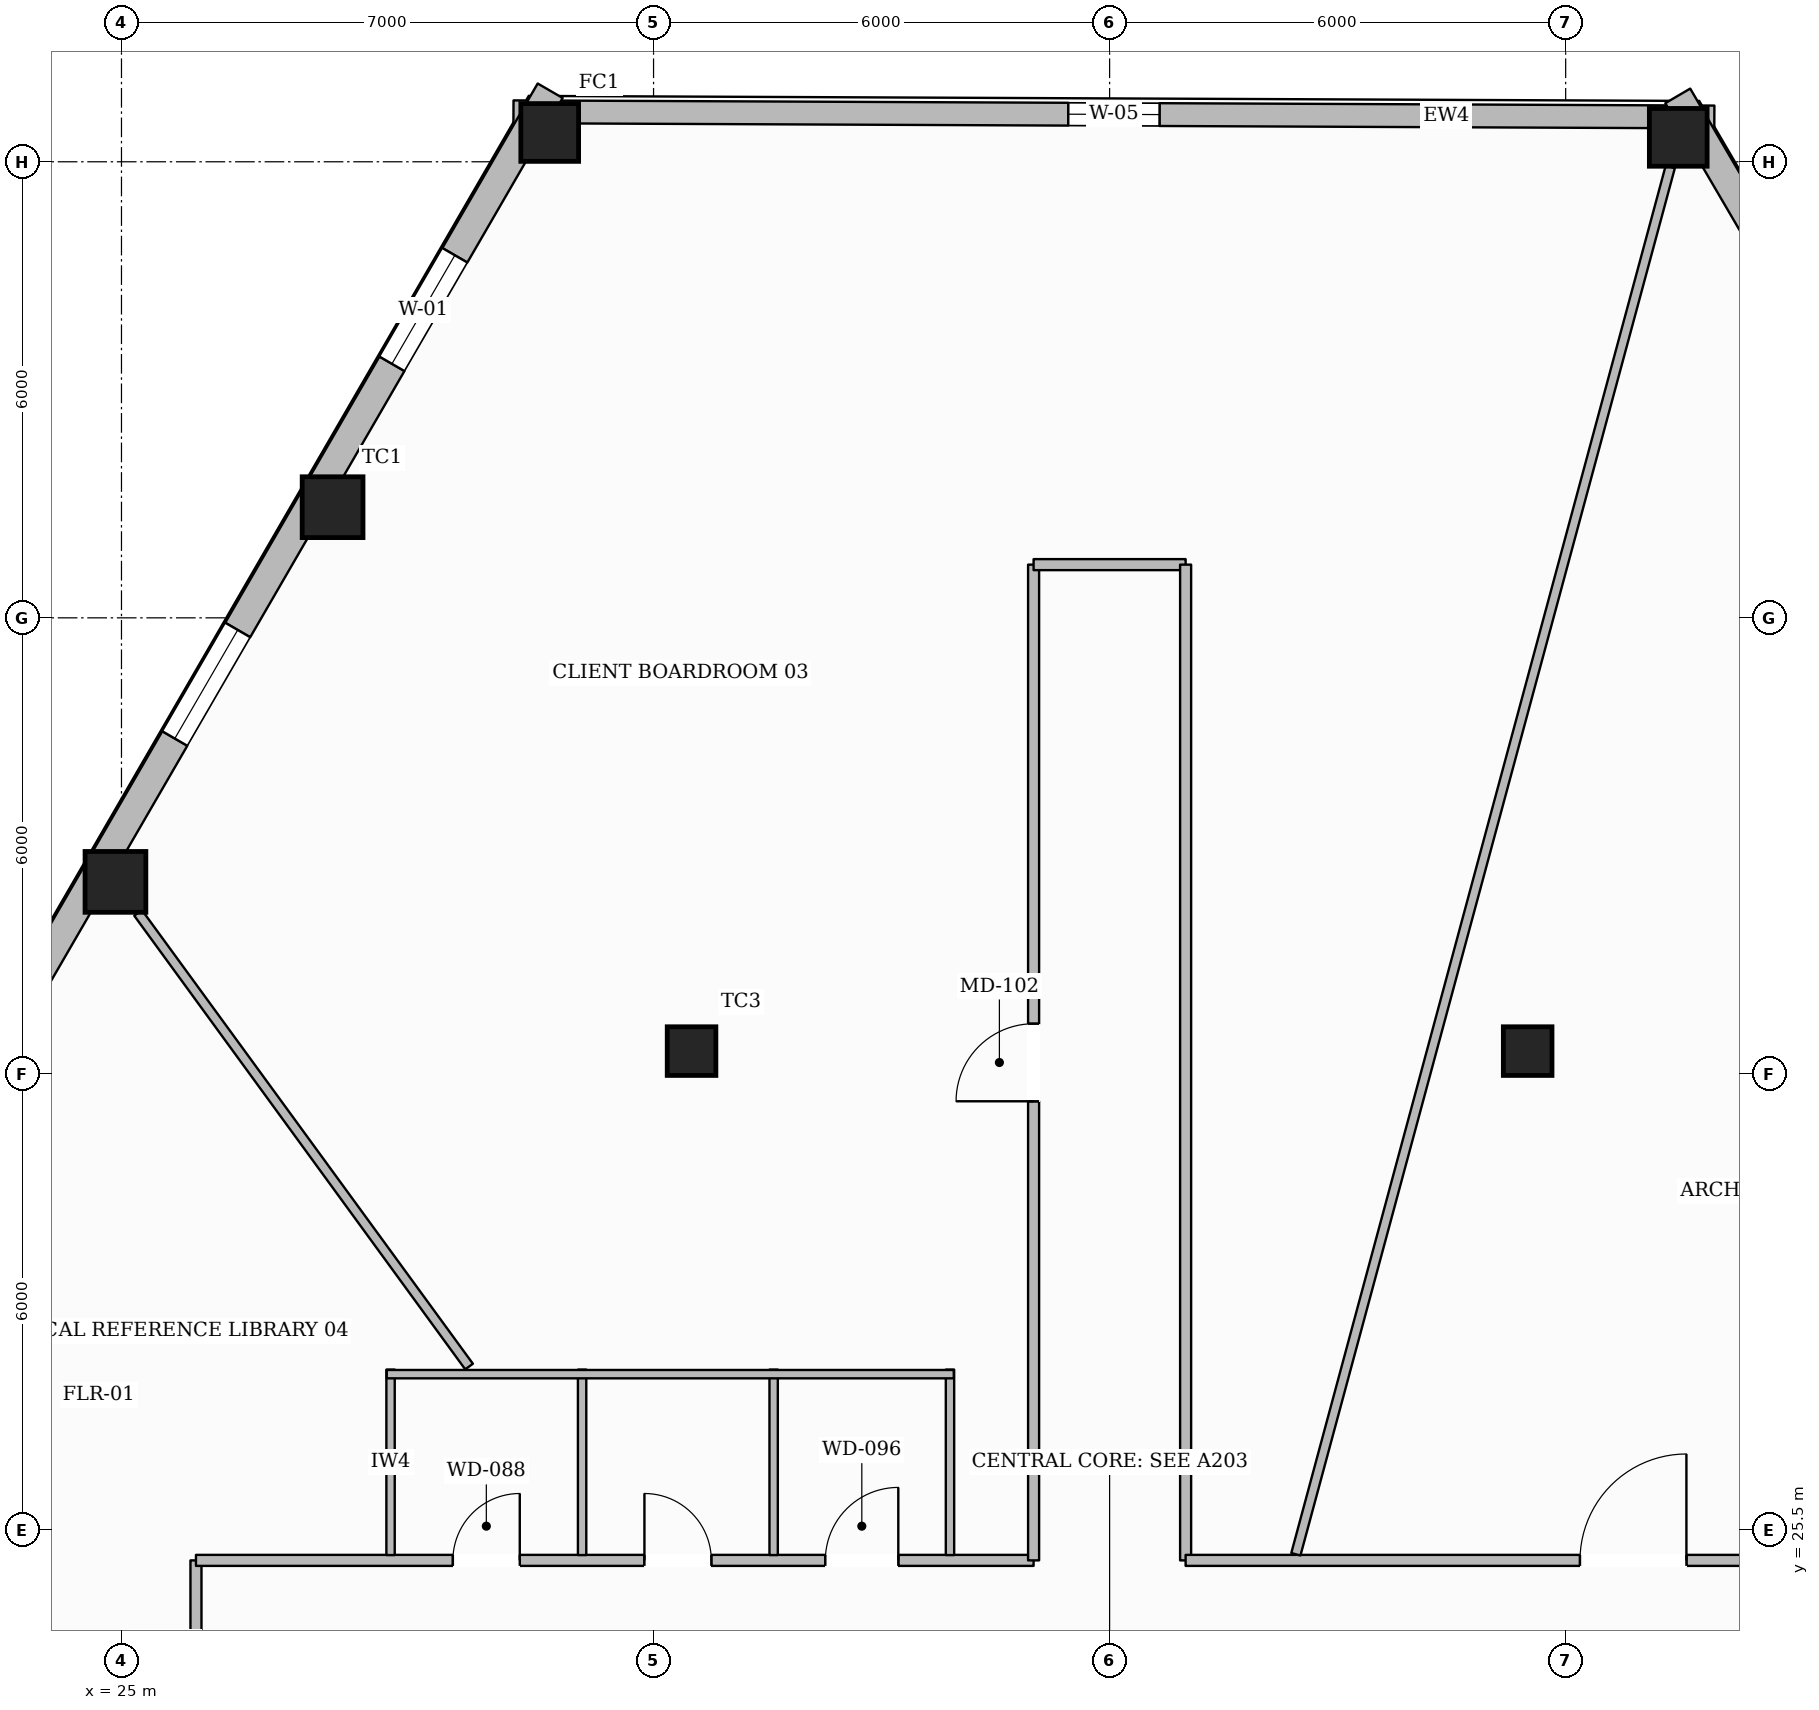
"""IFC4 building model, lengths in metres.
Left out: names, types, materials, properties, quantities, classifications, styles, units other than length and angle.
Written with IfcOpenShell. Run it as: python <this file> out.ifc"""

import sys

from ifc_helpers import new_model, si_unit, direction, frame, frame_2d, origin, origin_2d, place, context, subcontext, project, spatial, rectangle, hollow_rectangle, extrude, element, fill, save


model = new_model("IFC4")
c1 = context("Model", 3, precision=1e-05, world=origin(), true_north=direction((0.0, 1.0)))
c2 = subcontext(c1, "Body", "Model", "MODEL_VIEW")
j1 = project(units=[si_unit("LENGTHUNIT", "METRE"), si_unit("PLANEANGLEUNIT", "RADIAN")], contexts=[c1])
p1 = place(None, origin())
s1 = spatial("IfcSite", under=j1, at=p1, CompositionType="ELEMENT")
p2 = place(p1, origin())
s2 = spatial("IfcBuilding", under=s1, at=p2, CompositionType="ELEMENT")
p3 = place(p2, frame((0.0, 0.0, 52.2)))
s3 = spatial("IfcBuildingStorey", under=s2, at=p3, CompositionType="ELEMENT", Elevation=52.2)
p4 = place(p3, frame((30.634, 43.885, 0.0), z_axis=(0.0, 0.0, 1.0), x_axis=(1.0, 0.0, 0.0)))
e1 = element("IfcColumn", 1, at=p4, inside=s3, PredefinedType="COLUMN", context=c2, shape_type="SweptSolid", body=[
    extrude(hollow_rectangle(XDim=0.76, YDim=0.76, WallThickness=0.035, at=origin_2d()), origin(), (0.0, 0.0, 1.0), 3.59),
])
for number, where, z_axis, x_axis in (
    (2, (27.777, 38.956, 0.0), (0.0, 0.0, 1.0), (1.0, 0.0, 0.0)),
    (3, (24.921, 34.026, 0.0), (0.0, 0.0, 1.0), (1.0, 0.0, 0.0)),
):
    element("IfcColumn", number, at=place(p3, frame(where, z_axis=z_axis, x_axis=x_axis)), inside=s3, PredefinedType="COLUMN", context=c2, shape_type="SweptSolid", body=[
        extrude(hollow_rectangle(XDim=0.8, YDim=0.8, WallThickness=0.036, at=origin_2d()), origin(), (0.0, 0.0, 1.0), 3.59),
    ])
p5 = place(p3, frame((45.481, 43.821, 0.0), z_axis=(0.0, 0.0, 1.0), x_axis=(1.0, 0.0, 0.0)))
e4 = element("IfcColumn", 4, at=p5, inside=s3, PredefinedType="COLUMN", context=c2, shape_type="SweptSolid", body=[
    extrude(hollow_rectangle(XDim=0.76, YDim=0.76, WallThickness=0.035, at=origin_2d()), origin(), (0.0, 0.0, 1.0), 3.59),
])
for number, where, z_axis, x_axis in (
    (5, (32.5, 31.8, 0.0), (0.0, 0.0, 1.0), (1.0, 0.0, 0.0)),
    (6, (43.5, 31.8, 0.0), (0.0, 0.0, 1.0), (1.0, 0.0, 0.0)),
):
    element("IfcColumn", number, at=place(p3, frame(where, z_axis=z_axis, x_axis=x_axis)), inside=s3, PredefinedType="COLUMN", context=c2, shape_type="SweptSolid", body=[
        extrude(hollow_rectangle(XDim=0.64, YDim=0.64, WallThickness=0.028, at=origin_2d()), origin(), (0.0, 0.0, 1.0), 3.59),
    ])
p6 = place(p3, frame((30.157, 44.157, 0.0), z_axis=(0.0, 0.0, 1.0), x_axis=(0.999990705999, -0.004311370487, 0.0)))
e7 = element("IfcWall", 7, at=p6, inside=s3, PredefinedType="STANDARD", context=c2, shape_type="SweptSolid", body=[
    extrude(rectangle(XDim=15.799, YDim=0.3, at=frame_2d((7.899, 0.0))), origin(), (0.0, 0.0, 1.0), 2.97),
])
p7 = place(p6, frame((7.3, 0.0, 0.65)))
e8 = element("IfcOpeningElement", 8, at=p7, cuts=e7, PredefinedType="OPENING", context=c2, shape_type="SweptSolid", body=[
    extrude(rectangle(XDim=1.2, YDim=1.7, at=frame_2d((0.6, 0.85))), frame((0.0, 0.16, 0.0), z_axis=(0.0, -1.0, 0.0), x_axis=(1.0, 0.0, 0.0)), (0.0, 0.0, 1.0), 0.32),
])
p8 = place(p3, frame((13.02, 14.028, 0.0), z_axis=(0.0, 0.0, 1.0), x_axis=(0.501385664719, 0.86522391045, 0.0)))
e9 = element("IfcWall", 9, at=p8, inside=s3, PredefinedType="STANDARD", context=c2, shape_type="SweptSolid", body=[
    extrude(rectangle(XDim=35.142, YDim=0.38, at=frame_2d((17.571, 0.0))), origin(), (0.0, 0.0, 1.0), 2.97),
])
p9 = place(p8, frame((30.991, 0.0, 0.65)))
e10 = element("IfcOpeningElement", 10, at=p9, cuts=e9, PredefinedType="OPENING", context=c2, shape_type="SweptSolid", body=[
    extrude(rectangle(XDim=1.65, YDim=1.75, at=frame_2d((0.825, 0.875))), frame((0.0, 0.2, 0.0), z_axis=(0.0, -1.0, 0.0), x_axis=(1.0, 0.0, 0.0)), (0.0, 0.0, 1.0), 0.4),
])
p10 = place(p8, frame((25.293, 0.0, 0.65)))
e11 = element("IfcOpeningElement", 11, at=p10, cuts=e9, PredefinedType="OPENING", context=c2, shape_type="SweptSolid", body=[
    extrude(rectangle(XDim=1.65, YDim=1.75, at=frame_2d((0.825, 0.875))), frame((0.0, 0.2, 0.0), z_axis=(0.0, -1.0, 0.0), x_axis=(1.0, 0.0, 0.0)), (0.0, 0.0, 1.0), 0.4),
])
p11 = place(p8, frame((13.898, 0.0, 0.65)))
e12 = element("IfcOpeningElement", 12, at=p11, cuts=e9, PredefinedType="OPENING", context=c2, shape_type="SweptSolid", body=[
    extrude(rectangle(XDim=1.65, YDim=1.75, at=frame_2d((0.825, 0.875))), frame((0.0, 0.2, 0.0), z_axis=(0.0, -1.0, 0.0), x_axis=(1.0, 0.0, 0.0)), (0.0, 0.0, 1.0), 0.4),
])
p12 = place(p8, frame((8.201, 0.0, 0.65)))
e13 = element("IfcOpeningElement", 13, at=p12, cuts=e9, PredefinedType="OPENING", context=c2, shape_type="SweptSolid", body=[
    extrude(rectangle(XDim=1.65, YDim=1.75, at=frame_2d((0.825, 0.875))), frame((0.0, 0.2, 0.0), z_axis=(0.0, -1.0, 0.0), x_axis=(1.0, 0.0, 0.0)), (0.0, 0.0, 1.0), 0.4),
])
p13 = place(p8, frame((2.503, 0.0, 0.65)))
e14 = element("IfcOpeningElement", 14, at=p13, cuts=e9, PredefinedType="OPENING", context=c2, shape_type="SweptSolid", body=[
    extrude(rectangle(XDim=1.65, YDim=1.75, at=frame_2d((0.825, 0.875))), frame((0.0, 0.2, 0.0), z_axis=(0.0, -1.0, 0.0), x_axis=(1.0, 0.0, 0.0)), (0.0, 0.0, 1.0), 0.4),
])
p14 = place(p3, frame((45.475, 44.367, 0.0), z_axis=(0.0, 0.0, 1.0), x_axis=(0.505110430219, -0.863054722068, 0.0)))
e15 = element("IfcWall", 15, at=p14, inside=s3, PredefinedType="STANDARD", context=c2, shape_type="SweptSolid", body=[
    extrude(rectangle(XDim=35.405, YDim=0.38, at=frame_2d((17.703, 0.0))), origin(), (0.0, 0.0, 1.0), 2.97),
])
p15 = place(p14, frame((31.23, 0.0, 0.65)))
e16 = element("IfcOpeningElement", 16, at=p15, cuts=e15, PredefinedType="OPENING", context=c2, shape_type="SweptSolid", body=[
    extrude(rectangle(XDim=1.65, YDim=1.75, at=frame_2d((0.825, 0.875))), frame((0.0, 0.2, 0.0), z_axis=(0.0, -1.0, 0.0), x_axis=(1.0, 0.0, 0.0)), (0.0, 0.0, 1.0), 0.4),
])
p16 = place(p14, frame((25.488, 0.0, 0.65)))
e17 = element("IfcOpeningElement", 17, at=p16, cuts=e15, PredefinedType="OPENING", context=c2, shape_type="SweptSolid", body=[
    extrude(rectangle(XDim=1.65, YDim=1.75, at=frame_2d((0.825, 0.875))), frame((0.0, 0.2, 0.0), z_axis=(0.0, -1.0, 0.0), x_axis=(1.0, 0.0, 0.0)), (0.0, 0.0, 1.0), 0.4),
])
p17 = place(p14, frame((14.004, 0.0, 0.65)))
e18 = element("IfcOpeningElement", 18, at=p17, cuts=e15, PredefinedType="OPENING", context=c2, shape_type="SweptSolid", body=[
    extrude(rectangle(XDim=1.65, YDim=1.75, at=frame_2d((0.825, 0.875))), frame((0.0, 0.2, 0.0), z_axis=(0.0, -1.0, 0.0), x_axis=(1.0, 0.0, 0.0)), (0.0, 0.0, 1.0), 0.4),
])
p18 = place(p14, frame((8.262, 0.0, 0.65)))
e19 = element("IfcOpeningElement", 19, at=p18, cuts=e15, PredefinedType="OPENING", context=c2, shape_type="SweptSolid", body=[
    extrude(rectangle(XDim=1.65, YDim=1.75, at=frame_2d((0.825, 0.875))), frame((0.0, 0.2, 0.0), z_axis=(0.0, -1.0, 0.0), x_axis=(1.0, 0.0, 0.0)), (0.0, 0.0, 1.0), 0.4),
])
p19 = place(p14, frame((2.52, 0.0, 0.65)))
e20 = element("IfcOpeningElement", 20, at=p19, cuts=e15, PredefinedType="OPENING", context=c2, shape_type="SweptSolid", body=[
    extrude(rectangle(XDim=1.65, YDim=1.75, at=frame_2d((0.825, 0.875))), frame((0.0, 0.2, 0.0), z_axis=(0.0, -1.0, 0.0), x_axis=(1.0, 0.0, 0.0)), (0.0, 0.0, 1.0), 0.4),
])
p20 = place(p3, frame((25.98, 9.1, 0.0), z_axis=(0.0, 0.0, 1.0), x_axis=(0.0, 1.0, 0.0)))
e21 = element("IfcWall", 21, at=p20, inside=s3, PredefinedType="PARTITIONING", context=c2, shape_type="SweptSolid", body=[
    extrude(rectangle(XDim=16.0, YDim=0.145, at=frame_2d((8.0, 0.0))), origin(), (0.0, 0.0, 1.0), 3.278),
])
p21 = place(p20, frame((13.722, 0.0, 0.0)))
e22 = element("IfcOpeningElement", 22, at=p21, cuts=e21, PredefinedType="OPENING", context=c2, shape_type="SweptSolid", body=[
    extrude(rectangle(XDim=0.98, YDim=2.15, at=frame_2d((0.49, 1.075))), frame((0.0, 0.083, 0.0), z_axis=(0.0, -1.0, 0.0), x_axis=(1.0, 0.0, 0.0)), (0.0, 0.0, 1.0), 0.165),
])
p22 = place(p20, frame((7.387, 0.0, 0.0)))
e23 = element("IfcOpeningElement", 23, at=p22, cuts=e21, PredefinedType="OPENING", context=c2, shape_type="SweptSolid", body=[
    extrude(rectangle(XDim=1.4, YDim=2.2, at=frame_2d((0.7, 1.1))), frame((0.0, 0.083, 0.0), z_axis=(0.0, -1.0, 0.0), x_axis=(1.0, 0.0, 0.0)), (0.0, 0.0, 1.0), 0.165),
])
p23 = place(p3, frame((25.98, 25.1, 0.0), z_axis=(0.0, 0.0, 1.0), x_axis=(1.0, 0.0, 0.0)))
e24 = element("IfcWall", 24, at=p23, inside=s3, PredefinedType="PARTITIONING", context=c2, shape_type="SweptSolid", body=[
    extrude(rectangle(XDim=11.02, YDim=0.145, at=frame_2d((5.51, 0.0))), origin(), (0.0, 0.0, 1.0), 3.59),
])
p24 = place(p23, frame((3.38, 0.0, 0.0)))
e25 = element("IfcOpeningElement", 25, at=p24, cuts=e24, PredefinedType="OPENING", context=c2, shape_type="SweptSolid", body=[
    extrude(rectangle(XDim=0.88, YDim=2.1, at=frame_2d((0.44, 1.05))), frame((0.0, 0.083, 0.0), z_axis=(0.0, -1.0, 0.0), x_axis=(1.0, 0.0, 0.0)), (0.0, 0.0, 1.0), 0.165),
])
p25 = place(p23, frame((5.9, 0.0, 0.0)))
e26 = element("IfcOpeningElement", 26, at=p25, cuts=e24, PredefinedType="OPENING", context=c2, shape_type="SweptSolid", body=[
    extrude(rectangle(XDim=0.88, YDim=2.1, at=frame_2d((0.44, 1.05))), frame((0.0, 0.083, 0.0), z_axis=(0.0, -1.0, 0.0), x_axis=(1.0, 0.0, 0.0)), (0.0, 0.0, 1.0), 0.165),
])
p26 = place(p23, frame((8.28, 0.0, 0.0)))
e27 = element("IfcOpeningElement", 27, at=p26, cuts=e24, PredefinedType="OPENING", context=c2, shape_type="SweptSolid", body=[
    extrude(rectangle(XDim=0.96, YDim=2.1, at=frame_2d((0.48, 1.05))), frame((0.0, 0.083, 0.0), z_axis=(0.0, -1.0, 0.0), x_axis=(1.0, 0.0, 0.0)), (0.0, 0.0, 1.0), 0.165),
])
p27 = place(p3, frame((37.0, 25.1, 0.0), z_axis=(0.0, 0.0, 1.0), x_axis=(0.0, 1.0, 0.0)))
e28 = element("IfcWall", 28, at=p27, inside=s3, PredefinedType="PARTITIONING", context=c2, shape_type="SweptSolid", body=[
    extrude(rectangle(XDim=13.1, YDim=0.145, at=frame_2d((6.55, 0.0))), origin(), (0.0, 0.0, 1.0), 3.59),
])
p28 = place(p27, frame((6.04, 0.0, 0.0)))
e29 = element("IfcOpeningElement", 29, at=p28, cuts=e28, PredefinedType="OPENING", context=c2, shape_type="SweptSolid", body=[
    extrude(rectangle(XDim=1.02, YDim=2.15, at=frame_2d((0.51, 1.075))), frame((0.0, 0.083, 0.0), z_axis=(0.0, -1.0, 0.0), x_axis=(1.0, 0.0, 0.0)), (0.0, 0.0, 1.0), 0.165),
])
p29 = place(p3, frame((37.0, 38.2, 0.0), z_axis=(0.0, 0.0, 1.0), x_axis=(1.0, 0.0, 0.0)))
e30 = element("IfcWall", 30, at=p29, inside=s3, PredefinedType="PARTITIONING", context=c2, shape_type="SweptSolid", body=[
    extrude(rectangle(XDim=2.0, YDim=0.145, at=frame_2d((1.0, 0.0))), origin(), (0.0, 0.0, 1.0), 3.59),
])
p30 = place(p3, frame((39.0, 38.2, 0.0), z_axis=(0.0, 0.0, 1.0), x_axis=(0.0, -1.0, 0.0)))
e31 = element("IfcWall", 31, at=p30, inside=s3, PredefinedType="PARTITIONING", context=c2, shape_type="SweptSolid", body=[
    extrude(rectangle(XDim=13.1, YDim=0.145, at=frame_2d((6.55, 0.0))), origin(), (0.0, 0.0, 1.0), 3.59),
])
p31 = place(p3, frame((39.0, 25.1, 0.0), z_axis=(0.0, 0.0, 1.0), x_axis=(1.0, 0.0, 0.0)))
e32 = element("IfcWall", 32, at=p31, inside=s3, PredefinedType="PARTITIONING", context=c2, shape_type="SweptSolid", body=[
    extrude(rectangle(XDim=11.02, YDim=0.145, at=frame_2d((5.51, 0.0))), origin(), (0.0, 0.0, 1.0), 3.59),
])
p32 = place(p31, frame((5.189, 0.0, 0.0)))
e33 = element("IfcOpeningElement", 33, at=p32, cuts=e32, PredefinedType="OPENING", context=c2, shape_type="SweptSolid", body=[
    extrude(rectangle(XDim=1.4, YDim=2.2, at=frame_2d((0.7, 1.1))), frame((0.0, 0.083, 0.0), z_axis=(0.0, -1.0, 0.0), x_axis=(1.0, 0.0, 0.0)), (0.0, 0.0, 1.0), 0.165),
])
for number, where, z_axis, x_axis in (
    (34, (28.54, 25.17, 0.0), (0.0, 0.0, 1.0), (0.0, 1.0, 0.0)),
    (35, (31.06, 25.17, 0.0), (0.0, 0.0, 1.0), (0.0, 1.0, 0.0)),
    (36, (33.58, 25.17, 0.0), (0.0, 0.0, 1.0), (0.0, 1.0, 0.0)),
    (37, (35.9, 25.17, 0.0), (0.0, 0.0, 1.0), (0.0, 1.0, 0.0)),
):
    element("IfcWall", number, at=place(p3, frame(where, z_axis=z_axis, x_axis=x_axis)), inside=s3, PredefinedType="PLUMBINGWALL", context=c2, shape_type="SweptSolid", body=[
        extrude(rectangle(XDim=2.44, YDim=0.11, at=frame_2d((1.22, 0.0))), origin(), (0.0, 0.0, 1.0), 3.59),
    ])
p33 = place(p3, frame((28.49, 27.55, 0.0), z_axis=(0.0, 0.0, 1.0), x_axis=(1.0, 0.0, 0.0)))
e38 = element("IfcWall", 38, at=p33, inside=s3, PredefinedType="PLUMBINGWALL", context=c2, shape_type="SweptSolid", body=[
    extrude(rectangle(XDim=7.46, YDim=0.11, at=frame_2d((3.73, 0.0))), origin(), (0.0, 0.0, 1.0), 3.59),
])
p34 = place(p3, frame((40.45, 25.18, 0.0), z_axis=(0.0, 0.0, 1.0), x_axis=(0.26055415647, 0.965459233498, 0.0)))
e39 = element("IfcWall", 39, at=p34, inside=s3, PredefinedType="PARTITIONING", context=c2, shape_type="SweptSolid", body=[
    extrude(rectangle(XDim=18.906, YDim=0.125, at=frame_2d((9.453, 0.0))), origin(), (0.0, 0.0, 1.0), 3.59),
])
p35 = place(p3, frame((29.573, 27.65, 0.0), z_axis=(0.0, 0.0, 1.0), x_axis=(-0.589404961233, 0.807837726077, 0.0)))
e40 = element("IfcWall", 40, at=p35, inside=s3, PredefinedType="PARTITIONING", context=c2, shape_type="SweptSolid", body=[
    extrude(rectangle(XDim=7.388, YDim=0.125, at=frame_2d((3.694, 0.0))), origin(), (0.0, 0.0, 1.0), 3.057),
])
p36 = place(p9, origin())
e41 = element("IfcWindow", 41, at=p36, inside=s3, PartitioningType="SINGLE_PANEL", PredefinedType="WINDOW", context=c2, shape_type="SweptSolid", body=[
    extrude(rectangle(XDim=1.65, YDim=1.75, at=frame_2d((0.825, 0.875))), frame((0.0, 0.03, 0.0), z_axis=(0.0, -1.0, 0.0), x_axis=(1.0, 0.0, 0.0)), (0.0, 0.0, 1.0), 0.06),
])
fill(e10, e41)
p37 = place(p10, origin())
e42 = element("IfcWindow", 42, at=p37, inside=s3, PartitioningType="SINGLE_PANEL", PredefinedType="WINDOW", context=c2, shape_type="SweptSolid", body=[
    extrude(rectangle(XDim=1.65, YDim=1.75, at=frame_2d((0.825, 0.875))), frame((0.0, 0.03, 0.0), z_axis=(0.0, -1.0, 0.0), x_axis=(1.0, 0.0, 0.0)), (0.0, 0.0, 1.0), 0.06),
])
fill(e11, e42)
p38 = place(p7, origin())
e43 = element("IfcWindow", 43, at=p38, inside=s3, PartitioningType="SINGLE_PANEL", PredefinedType="WINDOW", context=c2, shape_type="SweptSolid", body=[
    extrude(rectangle(XDim=1.2, YDim=1.7, at=frame_2d((0.6, 0.85))), frame((0.0, 0.03, 0.0), z_axis=(0.0, -1.0, 0.0), x_axis=(1.0, 0.0, 0.0)), (0.0, 0.0, 1.0), 0.06),
])
fill(e8, e43)
p39 = place(p24, origin())
e44 = element("IfcDoor", 44, at=p39, inside=s3, OperationType="SINGLE_SWING_RIGHT", PredefinedType="DOOR", context=c2, shape_type="SweptSolid", body=[
    extrude(rectangle(XDim=0.88, YDim=2.1, at=frame_2d((0.44, 1.05))), frame((0.0, 0.025, 0.0), z_axis=(0.0, -1.0, 0.0), x_axis=(1.0, 0.0, 0.0)), (0.0, 0.0, 1.0), 0.05),
])
fill(e25, e44)
p40 = place(p25, origin())
e45 = element("IfcDoor", 45, at=p40, inside=s3, OperationType="SINGLE_SWING_LEFT", PredefinedType="DOOR", context=c2, shape_type="SweptSolid", body=[
    extrude(rectangle(XDim=0.88, YDim=2.1, at=frame_2d((0.44, 1.05))), frame((0.0, 0.025, 0.0), z_axis=(0.0, -1.0, 0.0), x_axis=(1.0, 0.0, 0.0)), (0.0, 0.0, 1.0), 0.05),
])
fill(e26, e45)
p41 = place(p26, origin())
e46 = element("IfcDoor", 46, at=p41, inside=s3, OperationType="SINGLE_SWING_RIGHT", PredefinedType="DOOR", context=c2, shape_type="SweptSolid", body=[
    extrude(rectangle(XDim=0.96, YDim=2.1, at=frame_2d((0.48, 1.05))), frame((0.0, 0.025, 0.0), z_axis=(0.0, -1.0, 0.0), x_axis=(1.0, 0.0, 0.0)), (0.0, 0.0, 1.0), 0.05),
])
fill(e27, e46)
p42 = place(p32, origin())
e47 = element("IfcDoor", 47, at=p42, inside=s3, OperationType="SINGLE_SWING_RIGHT", PredefinedType="DOOR", context=c2, shape_type="SweptSolid", body=[
    extrude(rectangle(XDim=1.4, YDim=2.2, at=frame_2d((0.7, 1.1))), frame((0.0, 0.025, 0.0), z_axis=(0.0, -1.0, 0.0), x_axis=(1.0, 0.0, 0.0)), (0.0, 0.0, 1.0), 0.05),
])
fill(e33, e47)
p43 = place(p28, origin())
e48 = element("IfcDoor", 48, at=p43, inside=s3, OperationType="SINGLE_SWING_LEFT", PredefinedType="DOOR", context=c2, shape_type="SweptSolid", body=[
    extrude(rectangle(XDim=1.02, YDim=2.15, at=frame_2d((0.51, 1.075))), frame((0.0, 0.025, 0.0), z_axis=(0.0, -1.0, 0.0), x_axis=(1.0, 0.0, 0.0)), (0.0, 0.0, 1.0), 0.05),
])
fill(e29, e48)
save(model, sys.argv[1])
